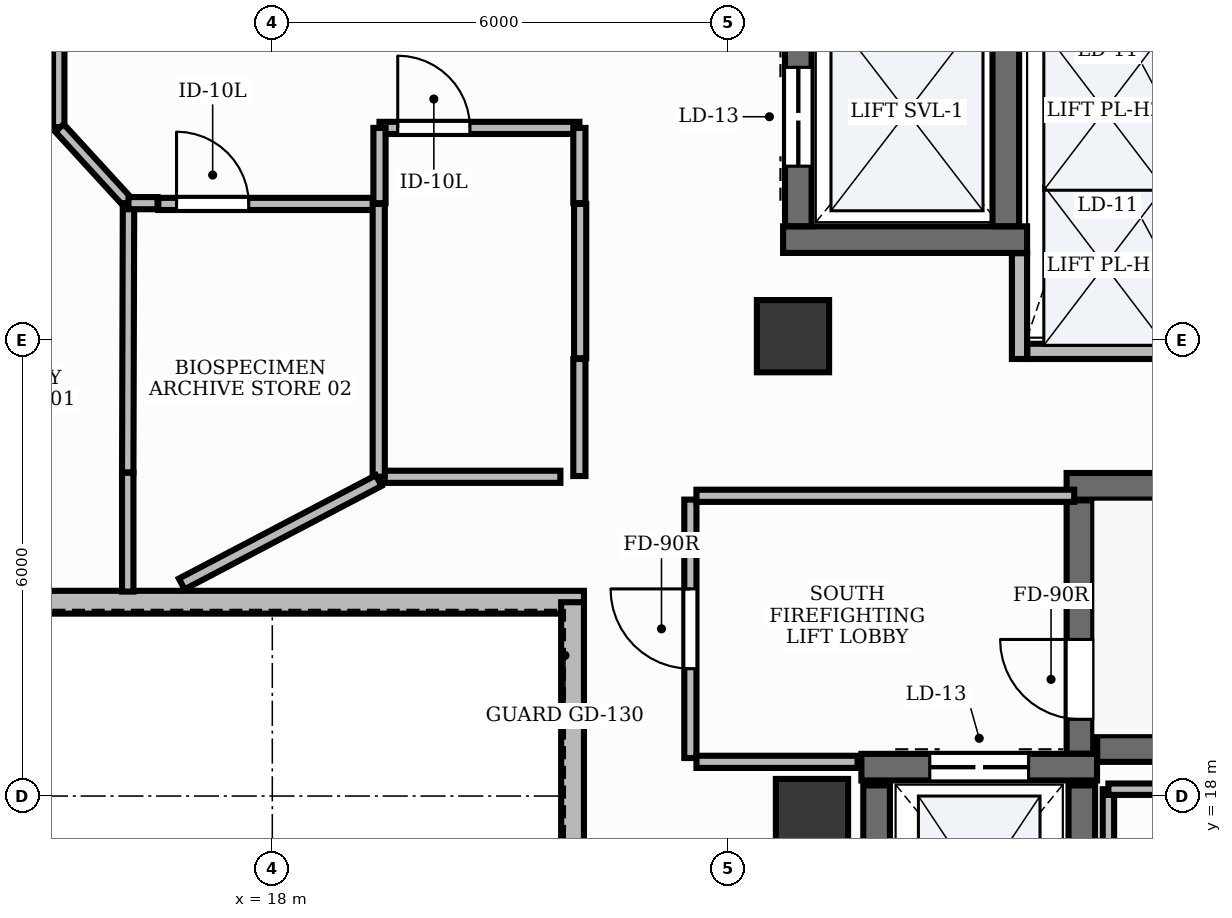
"""IFC4 building model, lengths in metres.
Left out: names, types, materials, properties, quantities, classifications, styles, units other than length and angle.
Written with IfcOpenShell. Run it as: python <this file> out.ifc"""

import sys

from ifc_helpers import new_model, si_unit, direction, frame, frame_2d, origin, origin_2d, place, context, subcontext, project, spatial, rectangle, extrude, element, fill, save


model = new_model("IFC4")
c1 = context("Model", 3, precision=1e-05, world=origin(), true_north=direction((0.0, 1.0)))
c2 = subcontext(c1, "Body", "Model", "MODEL_VIEW")
j1 = project(units=[si_unit("LENGTHUNIT", "METRE"), si_unit("PLANEANGLEUNIT", "RADIAN")], contexts=[c1])
p1 = place(None, origin())
s1 = spatial("IfcSite", under=j1, at=p1, CompositionType="ELEMENT")
p2 = place(p1, origin())
s2 = spatial("IfcBuilding", under=s1, at=p2, CompositionType="ELEMENT")
p3 = place(p2, frame((0.0, 0.0, 291.0)))
s3 = spatial("IfcBuildingStorey", under=s2, at=p3, CompositionType="ELEMENT", Elevation=291.0)
p4 = place(p3, frame((28.852, 18.625, 0.0), z_axis=(0.0, 0.0, 1.0), x_axis=(1.0, 0.0, 0.0)))
e1 = element("IfcWall", 1, at=p4, inside=s3, PredefinedType="SHEAR", context=c2, shape_type="SweptSolid", body=[
    extrude(rectangle(XDim=8.148, YDim=0.35, at=frame_2d((4.074, 0.0))), origin(), (0.0, 0.0, 1.0), 6.3),
])
p5 = place(p3, frame((28.45, 22.075, 0.0), z_axis=(0.0, 0.0, 1.0), x_axis=(1.0, 0.0, 0.0)))
e2 = element("IfcWall", 2, at=p5, inside=s3, PredefinedType="SHEAR", context=c2, shape_type="SweptSolid", body=[
    extrude(rectangle(XDim=8.55, YDim=0.35, at=frame_2d((4.275, 0.0))), origin(), (0.0, 0.0, 1.0), 6.3),
])
p6 = place(p3, frame((28.625, 18.557, 0.0), z_axis=(0.0, 0.0, 1.0), x_axis=(0.0, 1.0, 0.0)))
e3 = element("IfcWall", 3, at=p6, inside=s3, PredefinedType="SHEAR", context=c2, shape_type="SweptSolid", body=[
    extrude(rectangle(XDim=3.333, YDim=0.35, at=frame_2d((1.667, 0.0))), origin(), (0.0, 0.0, 1.0), 6.3),
])
p7 = place(p6, frame((0.453, 0.0, 0.0)))
e4 = element("IfcOpeningElement", 4, at=p7, cuts=e3, PredefinedType="OPENING", context=c2, shape_type="SweptSolid", body=[
    extrude(rectangle(XDim=1.05, YDim=2.15, at=frame_2d((0.525, 1.075))), frame((0.0, 0.19, 0.0), z_axis=(0.0, -1.0, 0.0), x_axis=(1.0, 0.0, 0.0)), (0.0, 0.0, 1.0), 0.38),
])
p8 = place(p3, frame((25.75, 18.38, 0.0), z_axis=(0.0, 0.0, 1.0), x_axis=(1.0, 0.0, 0.0)))
e5 = element("IfcWall", 5, at=p8, inside=s3, PredefinedType="SHEAR", context=c2, shape_type="SweptSolid", body=[
    extrude(rectangle(XDim=3.1, YDim=0.35, at=frame_2d((1.55, 0.0))), origin(), (0.0, 0.0, 1.0), 6.3),
])
p9 = place(p8, frame((0.9, 0.0, 0.0)))
e6 = element("IfcOpeningElement", 6, at=p9, cuts=e5, PredefinedType="OPENING", context=c2, shape_type="SweptSolid", body=[
    extrude(rectangle(XDim=1.3, YDim=2.2, at=frame_2d((0.65, 1.1))), frame((0.0, 0.19, 0.0), z_axis=(0.0, -1.0, 0.0), x_axis=(1.0, 0.0, 0.0)), (0.0, 0.0, 1.0), 0.38),
])
for number, where, z_axis, x_axis in (
    (7, (25.95, 15.44, 0.0), (0.0, 0.0, 1.0), (0.0, 1.0, 0.0)),
    (8, (28.65, 15.44, 0.0), (0.0, 0.0, 1.0), (0.0, 1.0, 0.0)),
):
    element("IfcWall", number, at=place(p3, frame(where, z_axis=z_axis, x_axis=x_axis)), inside=s3, PredefinedType="SHEAR", context=c2, shape_type="SweptSolid", body=[
        extrude(rectangle(XDim=2.7, YDim=0.35, at=frame_2d((1.35, 0.0))), origin(), (0.0, 0.0, 1.0), 6.3),
    ])
p10 = place(p3, frame((24.72, 25.32, 0.0), z_axis=(0.0, 0.0, 1.0), x_axis=(1.0, 0.0, 0.0)))
e9 = element("IfcWall", 9, at=p10, inside=s3, PredefinedType="SHEAR", context=c2, shape_type="SweptSolid", body=[
    extrude(rectangle(XDim=3.21, YDim=0.35, at=frame_2d((1.605, 0.0))), origin(), (0.0, 0.0, 1.0), 6.3),
])
p11 = place(p3, frame((24.92, 25.497, 0.0), z_axis=(0.0, 0.0, 1.0), x_axis=(0.0, 1.0, 0.0)))
e10 = element("IfcWall", 10, at=p11, inside=s3, PredefinedType="SHEAR", context=c2, shape_type="SweptSolid", body=[
    extrude(rectangle(XDim=3.006, YDim=0.35, at=frame_2d((1.503, 0.0))), origin(), (0.0, 0.0, 1.0), 6.3),
])
p12 = place(p11, frame((0.79, 0.0, 0.0)))
e11 = element("IfcOpeningElement", 11, at=p12, cuts=e10, PredefinedType="OPENING", context=c2, shape_type="SweptSolid", body=[
    extrude(rectangle(XDim=1.3, YDim=2.2, at=frame_2d((0.65, 1.1))), frame((0.0, 0.19, 0.0), z_axis=(0.0, -1.0, 0.0), x_axis=(1.0, 0.0, 0.0)), (0.0, 0.0, 1.0), 0.38),
])
p13 = place(p3, frame((27.65, 25.497, 0.0), z_axis=(0.0, 0.0, 1.0), x_axis=(0.0, 1.0, 0.0)))
e12 = element("IfcWall", 12, at=p13, inside=s3, PredefinedType="SHEAR", context=c2, shape_type="SweptSolid", body=[
    extrude(rectangle(XDim=3.006, YDim=0.35, at=frame_2d((1.503, 0.0))), origin(), (0.0, 0.0, 1.0), 6.3),
])
for number, where, z_axis, x_axis in (
    (13, (24.85, 24.05, -0.0), (0.0, 0.0, 1.0), (1.0, 0.0, 0.0)),
    (14, (25.1, 17.75, -0.0), (0.0, 0.0, 1.0), (1.0, 0.0, 0.0)),
):
    element("IfcColumn", number, at=place(p3, frame(where, z_axis=z_axis, x_axis=x_axis)), inside=s3, PredefinedType="PILASTER", context=c2, shape_type="SweptSolid", body=[
        extrude(rectangle(XDim=0.95, YDim=0.95, at=origin_2d()), origin(), (0.0, 0.0, 1.0), 6.301),
    ])
p14 = place(p3, frame((11.6, 20.55, 0.0), z_axis=(0.0, 0.0, 1.0), x_axis=(1.0, 0.0, 0.0)))
e15 = element("IfcWall", 15, at=p14, inside=s3, PredefinedType="STANDARD", context=c2, shape_type="SweptSolid", body=[
    extrude(rectangle(XDim=10.5, YDim=0.3, at=frame_2d((5.25, 0.0))), origin(), (0.0, 0.0, 1.0), 6.3),
])
p15 = place(p3, frame((21.95, 9.4, 0.0), z_axis=(0.0, 0.0, 1.0), x_axis=(0.0, 1.0, 0.0)))
e16 = element("IfcWall", 16, at=p15, inside=s3, PredefinedType="STANDARD", context=c2, shape_type="SweptSolid", body=[
    extrude(rectangle(XDim=11.15, YDim=0.3, at=frame_2d((5.575, 0.0))), origin(), (0.0, 0.0, 1.0), 4.625),
])
p16 = place(p3, frame((27.83, 23.75, 0.0), z_axis=(0.0, 0.0, 1.0), x_axis=(0.0, 1.0, 0.0)))
e17 = element("IfcWall", 17, at=p16, inside=s3, PredefinedType="PARTITIONING", context=c2, shape_type="SweptSolid", body=[
    extrude(rectangle(XDim=1.391, YDim=0.2, at=frame_2d((0.696, 0.0))), origin(), (0.0, 0.0, 1.0), 4.61),
])
p17 = place(p3, frame((27.934, 23.85, 0.0), z_axis=(0.0, 0.0, 1.0), x_axis=(1.0, 0.0, 0.0)))
e18 = element("IfcWall", 18, at=p17, inside=s3, PredefinedType="PARTITIONING", context=c2, shape_type="SweptSolid", body=[
    extrude(rectangle(XDim=2.096, YDim=0.2, at=frame_2d((1.048, 0.0))), origin(), (0.0, 0.0, 1.0), 4.61),
])
p18 = place(p3, frame((23.5, 18.5, 0.0), z_axis=(0.0, 0.0, 1.0), x_axis=(0.0, 1.0, 0.0)))
e19 = element("IfcWall", 19, at=p18, inside=s3, PredefinedType="PARTITIONING", context=c2, shape_type="SweptSolid", body=[
    extrude(rectangle(XDim=3.4, YDim=0.16, at=frame_2d((1.7, 0.0))), origin(), (0.0, 0.0, 1.0), 4.61),
])
p19 = place(p18, frame((1.175, 0.0, 0.0)))
e20 = element("IfcOpeningElement", 20, at=p19, cuts=e19, PredefinedType="OPENING", context=c2, shape_type="SweptSolid", body=[
    extrude(rectangle(XDim=1.05, YDim=2.15, at=frame_2d((0.525, 1.075))), frame((0.0, 0.095, 0.0), z_axis=(0.0, -1.0, 0.0), x_axis=(1.0, 0.0, 0.0)), (0.0, 0.0, 1.0), 0.19),
])
p20 = place(p3, frame((23.58, 21.95, 0.0), z_axis=(0.0, 0.0, 1.0), x_axis=(1.0, 0.0, 0.0)))
e21 = element("IfcWall", 21, at=p20, inside=s3, PredefinedType="PARTITIONING", context=c2, shape_type="SweptSolid", body=[
    extrude(rectangle(XDim=4.97, YDim=0.16, at=frame_2d((2.485, 0.0))), origin(), (0.0, 0.0, 1.0), 4.61),
])
p21 = place(p3, frame((23.58, 18.45, 0.0), z_axis=(0.0, 0.0, 1.0), x_axis=(1.0, 0.0, 0.0)))
e22 = element("IfcWall", 22, at=p21, inside=s3, PredefinedType="PARTITIONING", context=c2, shape_type="SweptSolid", body=[
    extrude(rectangle(XDim=2.12, YDim=0.16, at=frame_2d((1.06, 0.0))), origin(), (0.0, 0.0, 1.0), 4.61),
])
p22 = place(p3, frame((19.41, 26.79, 0.0), z_axis=(0.0, 0.0, 1.0), x_axis=(1.0, 0.0, 0.0)))
e23 = element("IfcWall", 23, at=p22, inside=s3, PredefinedType="PARTITIONING", context=c2, shape_type="SweptSolid", body=[
    extrude(rectangle(XDim=2.63, YDim=0.16, at=frame_2d((1.315, 0.0))), origin(), (0.0, 0.0, 1.0), 4.61),
])
p23 = place(p22, frame((0.24, 0.0, 0.0)))
e24 = element("IfcOpeningElement", 24, at=p23, cuts=e23, PredefinedType="OPENING", context=c2, shape_type="SweptSolid", body=[
    extrude(rectangle(XDim=0.95, YDim=2.15, at=frame_2d((0.475, 1.075))), frame((0.0, 0.095, 0.0), z_axis=(0.0, -1.0, 0.0), x_axis=(1.0, 0.0, 0.0)), (0.0, 0.0, 1.0), 0.19),
])
p24 = place(p3, frame((15.19, 29.4, 0.0), z_axis=(0.0, 0.0, 1.0), x_axis=(0.0, -1.0, 0.0)))
e25 = element("IfcWall", 25, at=p24, inside=s3, PredefinedType="PARTITIONING", context=c2, shape_type="SweptSolid", body=[
    extrude(rectangle(XDim=2.6, YDim=0.15, at=frame_2d((1.3, 0.0))), origin(), (0.0, 0.0, 1.0), 4.61),
])
p25 = place(p24, frame((0.24, 0.0, 0.0)))
e26 = element("IfcOpeningElement", 26, at=p25, cuts=e25, PredefinedType="OPENING", context=c2, shape_type="SweptSolid", body=[
    extrude(rectangle(XDim=0.95, YDim=2.15, at=frame_2d((0.475, 1.075))), frame((0.0, 0.09, 0.0), z_axis=(0.0, -1.0, 0.0), x_axis=(1.0, 0.0, 0.0)), (0.0, 0.0, 1.0), 0.18),
])
p26 = place(p3, frame((16.5, 25.79, 0.0), z_axis=(0.0, 0.0, 1.0), x_axis=(1.0, 0.0, 0.0)))
e27 = element("IfcWall", 27, at=p26, inside=s3, PredefinedType="PARTITIONING", context=c2, shape_type="SweptSolid", body=[
    extrude(rectangle(XDim=2.89, YDim=0.16, at=frame_2d((1.445, 0.0))), origin(), (0.0, 0.0, 1.0), 4.61),
])
p27 = place(p26, frame((0.24, 0.0, 0.0)))
e28 = element("IfcOpeningElement", 28, at=p27, cuts=e27, PredefinedType="OPENING", context=c2, shape_type="SweptSolid", body=[
    extrude(rectangle(XDim=0.95, YDim=2.15, at=frame_2d((0.475, 1.075))), frame((0.0, 0.095, 0.0), z_axis=(0.0, -1.0, 0.0), x_axis=(1.0, 0.0, 0.0)), (0.0, 0.0, 1.0), 0.19),
])
p28 = place(p3, frame((22.04, 23.75, 0.0), z_axis=(0.0, 0.0, 1.0), x_axis=(0.0, -1.0, 0.0)))
e29 = element("IfcWall", 29, at=p28, inside=s3, PredefinedType="PARTITIONING", context=c2, shape_type="SweptSolid", body=[
    extrude(rectangle(XDim=1.54, YDim=0.16, at=frame_2d((0.77, 0.0))), origin(), (0.0, 0.0, 1.0), 4.61),
])
p29 = place(p3, frame((21.79, 22.2, 0.0), z_axis=(0.0, 0.0, 1.0), x_axis=(-1.0, 0.0, 0.0)))
e30 = element("IfcWall", 30, at=p29, inside=s3, PredefinedType="PARTITIONING", context=c2, shape_type="SweptSolid", body=[
    extrude(rectangle(XDim=2.39, YDim=0.16, at=frame_2d((1.195, 0.0))), origin(), (0.0, 0.0, 1.0), 4.61),
])
p30 = place(p3, frame((19.4, 22.2, 0.0), z_axis=(0.0, 0.0, 1.0), x_axis=(0.0, 1.0, 0.0)))
e31 = element("IfcWall", 31, at=p30, inside=s3, PredefinedType="PARTITIONING", context=c2, shape_type="SweptSolid", body=[
    extrude(rectangle(XDim=3.59, YDim=0.16, at=frame_2d((1.795, 0.0))), origin(), (0.0, 0.0, 1.0), 4.61),
])
for number, where, z_axis, x_axis in (
    (32, (19.41, 25.8, 0.0), (0.0, 0.0, 1.0), (0.0, 1.0, 0.0)),
    (33, (22.04, 26.79, 0.0), (0.0, 0.0, 1.0), (0.0, -1.0, 0.0)),
):
    element("IfcWall", number, at=place(p3, frame(where, z_axis=z_axis, x_axis=x_axis)), inside=s3, PredefinedType="PARTITIONING", context=c2, shape_type="SweptSolid", body=[
        extrude(rectangle(XDim=0.99, YDim=0.16, at=frame_2d((0.495, 0.0))), origin(), (0.0, 0.0, 1.0), 4.61),
    ])
p31 = place(p3, frame((22.05, 25.79, 0.0), z_axis=(0.0, 0.0, 1.0), x_axis=(0.0, -1.0, 0.0)))
e34 = element("IfcWall", 34, at=p31, inside=s3, PredefinedType="PARTITIONING", context=c2, shape_type="SweptSolid", body=[
    extrude(rectangle(XDim=2.03, YDim=0.16, at=frame_2d((1.015, 0.0))), origin(), (0.0, 0.0, 1.0), 4.61),
])
p32 = place(p3, frame((15.2, 26.79, 0.0), z_axis=(0.0, 0.0, 1.0), x_axis=(0.675913896559, -0.736980599771, 0.0)))
e35 = element("IfcWall", 35, at=p32, inside=s3, PredefinedType="PARTITIONING", context=c2, shape_type="SweptSolid", body=[
    extrude(rectangle(XDim=1.343, YDim=0.15, at=frame_2d((0.672, 0.0))), origin(), (0.0, 0.0, 1.0), 4.61),
])
p33 = place(p3, frame((16.108, 25.8, 0.0), z_axis=(0.0, 0.0, 1.0), x_axis=(-0.002825236795, -0.999996009011, 0.0)))
e36 = element("IfcWall", 36, at=p33, inside=s3, PredefinedType="PARTITIONING", context=c2, shape_type="SweptSolid", body=[
    extrude(rectangle(XDim=3.543, YDim=0.15, at=frame_2d((1.771, 0.0))), origin(), (0.0, 0.0, 1.0), 4.61),
])
p34 = place(p3, frame((16.098, 22.253, 0.0), z_axis=(0.0, 0.0, 1.0), x_axis=(0.0, -1.0, 0.0)))
e37 = element("IfcWall", 37, at=p34, inside=s3, PredefinedType="PARTITIONING", context=c2, shape_type="SweptSolid", body=[
    extrude(rectangle(XDim=1.562, YDim=0.15, at=frame_2d((0.781, 0.0))), origin(), (0.0, 0.0, 1.0), 4.61),
])
p35 = place(p3, frame((16.108, 25.8, 0.0), z_axis=(0.0, 0.0, 1.0), x_axis=(1.0, 0.0, 0.0)))
e38 = element("IfcWall", 38, at=p35, inside=s3, PredefinedType="PARTITIONING", context=c2, shape_type="SweptSolid", body=[
    extrude(rectangle(XDim=0.382, YDim=0.16, at=frame_2d((0.191, 0.0))), origin(), (0.0, 0.0, 1.0), 4.61),
])
p36 = place(p3, frame((19.4, 22.15, 0.0), z_axis=(0.0, 0.0, 1.0), x_axis=(-0.885480277224, -0.464676961606, 0.0)))
e39 = element("IfcWall", 39, at=p36, inside=s3, PredefinedType="PARTITIONING", context=c2, shape_type="SweptSolid", body=[
    extrude(rectangle(XDim=2.927, YDim=0.16, at=frame_2d((1.463, 0.0))), origin(), (0.0, 0.0, 1.0), 4.61),
])
p37 = place(p3, frame((29.0, 14.954, 0.0), z_axis=(0.0, 0.0, 1.0), x_axis=(0.0, 1.0, 0.0)))
e40 = element("IfcWall", 40, at=p37, inside=s3, PredefinedType="PARTITIONING", context=c2, shape_type="SweptSolid", body=[
    extrude(rectangle(XDim=3.136, YDim=0.15, at=frame_2d((1.568, 0.0))), origin(), (0.0, 0.0, 1.0), 4.61),
])
p38 = place(p3, frame((29.0, 18.09, 0.0), z_axis=(0.0, 0.0, 1.0), x_axis=(1.0, 0.0, 0.0)))
e41 = element("IfcWall", 41, at=p38, inside=s3, PredefinedType="PARTITIONING", context=c2, shape_type="SweptSolid", body=[
    extrude(rectangle(XDim=2.945, YDim=0.15, at=frame_2d((1.473, 0.0))), origin(), (0.0, 0.0, 1.0), 4.61),
])
p39 = place(p7, origin())
e42 = element("IfcDoor", 42, at=p39, inside=s3, OperationType="SINGLE_SWING_RIGHT", PredefinedType="DOOR", context=c2, shape_type="SweptSolid", body=[
    extrude(rectangle(XDim=1.05, YDim=2.15, at=frame_2d((0.525, 1.075))), frame((0.0, 0.025, 0.0), z_axis=(0.0, -1.0, 0.0), x_axis=(1.0, 0.0, 0.0)), (0.0, 0.0, 1.0), 0.05),
])
fill(e4, e42)
p40 = place(p9, origin())
e43 = element("IfcDoor", 43, at=p40, inside=s3, OperationType="DOUBLE_DOOR_SLIDING", PredefinedType="DOOR", context=c2, shape_type="SweptSolid", body=[
    extrude(rectangle(XDim=1.3, YDim=2.2, at=frame_2d((0.65, 1.1))), frame((0.0, 0.025, 0.0), z_axis=(0.0, -1.0, 0.0), x_axis=(1.0, 0.0, 0.0)), (0.0, 0.0, 1.0), 0.05),
])
fill(e6, e43)
p41 = place(p12, origin())
e44 = element("IfcDoor", 44, at=p41, inside=s3, OperationType="DOUBLE_DOOR_SLIDING", PredefinedType="DOOR", context=c2, shape_type="SweptSolid", body=[
    extrude(rectangle(XDim=1.3, YDim=2.2, at=frame_2d((0.65, 1.1))), frame((0.0, 0.025, 0.0), z_axis=(0.0, -1.0, 0.0), x_axis=(1.0, 0.0, 0.0)), (0.0, 0.0, 1.0), 0.05),
])
fill(e11, e44)
p42 = place(p19, origin())
e45 = element("IfcDoor", 45, at=p42, inside=s3, OperationType="SINGLE_SWING_RIGHT", PredefinedType="DOOR", context=c2, shape_type="SweptSolid", body=[
    extrude(rectangle(XDim=1.05, YDim=2.15, at=frame_2d((0.525, 1.075))), frame((0.0, 0.025, 0.0), z_axis=(0.0, -1.0, 0.0), x_axis=(1.0, 0.0, 0.0)), (0.0, 0.0, 1.0), 0.05),
])
fill(e20, e45)
p43 = place(p23, origin())
e46 = element("IfcDoor", 46, at=p43, inside=s3, OperationType="SINGLE_SWING_LEFT", PredefinedType="DOOR", context=c2, shape_type="SweptSolid", body=[
    extrude(rectangle(XDim=0.95, YDim=2.15, at=frame_2d((0.475, 1.075))), frame((0.0, 0.025, 0.0), z_axis=(0.0, -1.0, 0.0), x_axis=(1.0, 0.0, 0.0)), (0.0, 0.0, 1.0), 0.05),
])
fill(e24, e46)
p44 = place(p27, origin())
e47 = element("IfcDoor", 47, at=p44, inside=s3, OperationType="SINGLE_SWING_LEFT", PredefinedType="DOOR", context=c2, shape_type="SweptSolid", body=[
    extrude(rectangle(XDim=0.95, YDim=2.15, at=frame_2d((0.475, 1.075))), frame((0.0, 0.025, 0.0), z_axis=(0.0, -1.0, 0.0), x_axis=(1.0, 0.0, 0.0)), (0.0, 0.0, 1.0), 0.05),
])
fill(e28, e47)
save(model, sys.argv[1])
